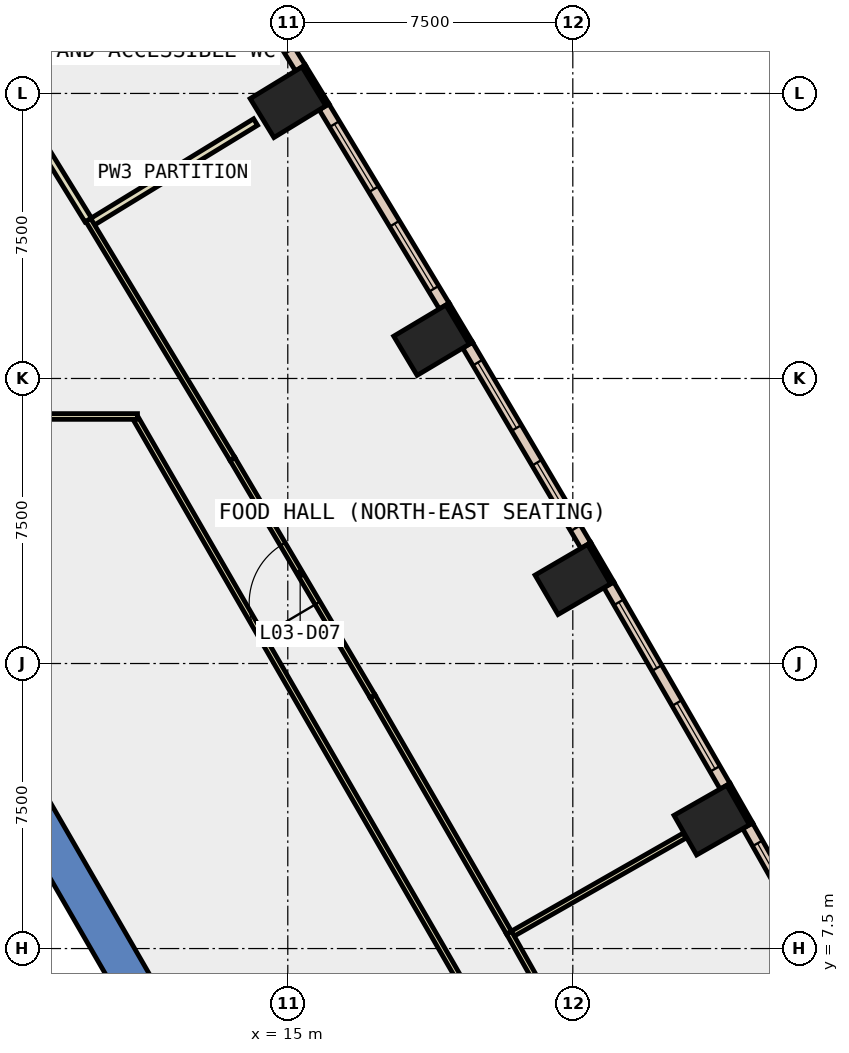
"""IFC4 building model, lengths in metres.
Left out: names, types, materials, properties, quantities, classifications, styles, units other than length and angle.
Written with IfcOpenShell. Run it as: python <this file> out.ifc"""

import sys

from ifc_helpers import new_model, si_unit, direction, frame, frame_2d, origin, origin_2d, place, context, subcontext, project, spatial, polyline, rectangle, outline, extrude, element, fill, save


model = new_model("IFC4")
c1 = context("Model", 3, precision=1e-05, world=origin(), true_north=direction((0.0, 1.0)))
c2 = subcontext(c1, "Body", "Model", "MODEL_VIEW")
j1 = project(units=[si_unit("LENGTHUNIT", "METRE"), si_unit("PLANEANGLEUNIT", "RADIAN")], contexts=[c1])
p1 = place(None, origin())
s1 = spatial("IfcSite", under=j1, at=p1, CompositionType="ELEMENT")
p2 = place(p1, origin())
s2 = spatial("IfcBuilding", under=s1, at=p2, CompositionType="ELEMENT")
p3 = place(p2, frame((0.0, 0.0, 20.0)))
s3 = spatial("IfcBuildingStorey", under=s2, at=p3, CompositionType="ELEMENT", Elevation=20.0)
for number, where, z_axis, x_axis in (
    (1, (26.155, 10.88, -0.45), (0.0, 0.0, 1.0), (-0.496, 0.869, 0.0)),
    (2, (22.5, 17.211, -0.45), (0.0, 0.0, 1.0), (-0.504, 0.864, 0.0)),
    (3, (18.782, 23.508, -0.45), (0.0, 0.0, 1.0), (-0.513, 0.858, 0.0)),
    (4, (15.005, 29.769, -0.45), (0.0, 0.0, 1.0), (-0.522, 0.853, 0.0)),
):
    element("IfcColumn", number, at=place(p3, frame(where, z_axis=z_axis, x_axis=x_axis)), inside=s3, PredefinedType="COLUMN", context=c2, shape_type="SweptSolid", body=[
        extrude(rectangle(XDim=1.2, YDim=1.6, at=origin_2d()), origin(), (0.0, 0.0, 1.0), 5.0),
    ])
p4 = place(p3, frame((0.0, 0.0, -0.45)))
e5 = element("IfcWall", 5, at=p4, inside=s3, PredefinedType="SHEAR", context=c2, shape_type="SweptSolid", body=[
    extrude(outline(polyline([(8.517, 11.748), (7.651, 11.248), (12.702, 2.5), (13.856, 2.5), (8.517, 11.748)])), origin(), (0.0, 0.0, 1.0), 5.0),
])
p5 = place(p3, frame((27.191, 10.78, 0.0), z_axis=(0.0, 0.0, 1.0), x_axis=(-0.495854054996, 0.868405870629, 0.0)))
e6 = element("IfcWall", 6, at=p5, inside=s3, PredefinedType="STANDARD", context=c2, shape_type="SweptSolid", body=[
    extrude(rectangle(XDim=1.2, YDim=0.1, at=frame_2d((0.6, 0.0))), origin(), (0.0, 0.0, 1.0), 4.55),
])
p6 = place(p3, frame((23.536, 17.122, 0.0), z_axis=(0.0, 0.0, 1.0), x_axis=(-0.504313844903, 0.863520437418, 0.0)))
e7 = element("IfcWall", 7, at=p6, inside=s3, PredefinedType="STANDARD", context=c2, shape_type="SweptSolid", body=[
    extrude(rectangle(XDim=1.2, YDim=0.1, at=frame_2d((0.6, 0.0))), origin(), (0.0, 0.0, 1.0), 4.55),
])
p7 = place(p3, frame((19.82, 23.429, 0.0), z_axis=(0.0, 0.0, 1.0), x_axis=(-0.513238760752, 0.858245870635, 0.0)))
e8 = element("IfcWall", 8, at=p7, inside=s3, PredefinedType="STANDARD", context=c2, shape_type="SweptSolid", body=[
    extrude(rectangle(XDim=1.2, YDim=0.1, at=frame_2d((0.6, 0.0))), origin(), (0.0, 0.0, 1.0), 4.55),
])
p8 = place(p3, frame((16.043, 29.7, 0.0), z_axis=(0.0, 0.0, 1.0), x_axis=(-0.521507599072, 0.853246637327, 0.0)))
e9 = element("IfcWall", 9, at=p8, inside=s3, PredefinedType="STANDARD", context=c2, shape_type="SweptSolid", body=[
    extrude(rectangle(XDim=1.2, YDim=0.1, at=frame_2d((0.6, 0.0))), origin(), (0.0, 0.0, 1.0), 4.55),
])
p9 = place(p3, frame((30.111, 5.399, 0.0), z_axis=(0.0, 0.0, 1.0), x_axis=(-0.491661677717, 0.870786308267, 0.0)))
e10 = element("IfcWall", 10, at=p9, inside=s3, PredefinedType="STANDARD", context=c2, shape_type="SweptSolid", body=[
    extrude(rectangle(XDim=6.122, YDim=0.3, at=frame_2d((3.061, 0.0))), origin(), (0.0, 0.0, 1.0), 4.55),
])
p10 = place(p9, frame((0.531, 0.0, 1.0)))
e11 = element("IfcOpeningElement", 11, at=p10, cuts=e10, PredefinedType="OPENING", context=c2, shape_type="SweptSolid", body=[
    extrude(rectangle(XDim=2.0, YDim=3.2, at=frame_2d((1.0, 1.6))), frame((0.0, 0.16, 0.0), z_axis=(0.0, -1.0, 0.0), x_axis=(1.0, 0.0, 0.0)), (0.0, 0.0, 1.0), 0.32),
])
p11 = place(p9, frame((3.592, 0.0, 1.0)))
e12 = element("IfcOpeningElement", 12, at=p11, cuts=e10, PredefinedType="OPENING", context=c2, shape_type="SweptSolid", body=[
    extrude(rectangle(XDim=2.0, YDim=3.2, at=frame_2d((1.0, 1.6))), frame((0.0, 0.16, 0.0), z_axis=(0.0, -1.0, 0.0), x_axis=(1.0, 0.0, 0.0)), (0.0, 0.0, 1.0), 0.32),
])
p12 = place(p3, frame((26.507, 11.77, 0.0), z_axis=(0.0, 0.0, 1.0), x_axis=(-0.499939977436, 0.866060055055, 0.0)))
e13 = element("IfcWall", 13, at=p12, inside=s3, PredefinedType="STANDARD", context=c2, shape_type="SweptSolid", body=[
    extrude(rectangle(XDim=6.121, YDim=0.3, at=frame_2d((3.061, 0.0))), origin(), (0.0, 0.0, 1.0), 4.55),
])
p13 = place(p12, frame((0.53, 0.0, 1.0)))
e14 = element("IfcOpeningElement", 14, at=p13, cuts=e13, PredefinedType="OPENING", context=c2, shape_type="SweptSolid", body=[
    extrude(rectangle(XDim=2.0, YDim=3.2, at=frame_2d((1.0, 1.6))), frame((0.0, 0.16, 0.0), z_axis=(0.0, -1.0, 0.0), x_axis=(1.0, 0.0, 0.0)), (0.0, 0.0, 1.0), 0.32),
])
p14 = place(p12, frame((3.591, 0.0, 1.0)))
e15 = element("IfcOpeningElement", 15, at=p14, cuts=e13, PredefinedType="OPENING", context=c2, shape_type="SweptSolid", body=[
    extrude(rectangle(XDim=2.0, YDim=3.2, at=frame_2d((1.0, 1.6))), frame((0.0, 0.16, 0.0), z_axis=(0.0, -1.0, 0.0), x_axis=(1.0, 0.0, 0.0)), (0.0, 0.0, 1.0), 0.32),
])
p15 = place(p3, frame((22.843, 18.105, 0.0), z_axis=(0.0, 0.0, 1.0), x_axis=(-0.50834231483, 0.861155091115, 0.0)))
e16 = element("IfcWall", 16, at=p15, inside=s3, PredefinedType="STANDARD", context=c2, shape_type="SweptSolid", body=[
    extrude(rectangle(XDim=6.122, YDim=0.3, at=frame_2d((3.061, 0.0))), origin(), (0.0, 0.0, 1.0), 4.55),
])
p16 = place(p15, frame((0.53, 0.0, 1.0)))
e17 = element("IfcOpeningElement", 17, at=p16, cuts=e16, PredefinedType="OPENING", context=c2, shape_type="SweptSolid", body=[
    extrude(rectangle(XDim=2.0, YDim=3.2, at=frame_2d((1.0, 1.6))), frame((0.0, 0.16, 0.0), z_axis=(0.0, -1.0, 0.0), x_axis=(1.0, 0.0, 0.0)), (0.0, 0.0, 1.0), 0.32),
])
p17 = place(p15, frame((3.591, 0.0, 1.0)))
e18 = element("IfcOpeningElement", 18, at=p17, cuts=e16, PredefinedType="OPENING", context=c2, shape_type="SweptSolid", body=[
    extrude(rectangle(XDim=2.0, YDim=3.2, at=frame_2d((1.0, 1.6))), frame((0.0, 0.16, 0.0), z_axis=(0.0, -1.0, 0.0), x_axis=(1.0, 0.0, 0.0)), (0.0, 0.0, 1.0), 0.32),
])
p18 = place(p3, frame((19.117, 24.406, 0.0), z_axis=(0.0, 0.0, 1.0), x_axis=(-0.516687651362, 0.85617397235, 0.0)))
e19 = element("IfcWall", 19, at=p18, inside=s3, PredefinedType="STANDARD", context=c2, shape_type="SweptSolid", body=[
    extrude(rectangle(XDim=6.121, YDim=0.3, at=frame_2d((3.061, 0.0))), origin(), (0.0, 0.0, 1.0), 4.55),
])
p19 = place(p18, frame((0.53, 0.0, 1.0)))
e20 = element("IfcOpeningElement", 20, at=p19, cuts=e19, PredefinedType="OPENING", context=c2, shape_type="SweptSolid", body=[
    extrude(rectangle(XDim=2.0, YDim=3.2, at=frame_2d((1.0, 1.6))), frame((0.0, 0.16, 0.0), z_axis=(0.0, -1.0, 0.0), x_axis=(1.0, 0.0, 0.0)), (0.0, 0.0, 1.0), 0.32),
])
p20 = place(p18, frame((3.591, 0.0, 1.0)))
e21 = element("IfcOpeningElement", 21, at=p20, cuts=e19, PredefinedType="OPENING", context=c2, shape_type="SweptSolid", body=[
    extrude(rectangle(XDim=2.0, YDim=3.2, at=frame_2d((1.0, 1.6))), frame((0.0, 0.16, 0.0), z_axis=(0.0, -1.0, 0.0), x_axis=(1.0, 0.0, 0.0)), (0.0, 0.0, 1.0), 0.32),
])
p21 = place(p3, frame((15.331, 30.67, 0.0), z_axis=(0.0, 0.0, 1.0), x_axis=(-0.524953701886, 0.85113078365, 0.0)))
e22 = element("IfcWall", 22, at=p21, inside=s3, PredefinedType="STANDARD", context=c2, shape_type="SweptSolid", body=[
    extrude(rectangle(XDim=6.123, YDim=0.3, at=frame_2d((3.061, 0.0))), origin(), (0.0, 0.0, 1.0), 4.55),
])
p22 = place(p21, frame((0.531, 0.0, 1.0)))
e23 = element("IfcOpeningElement", 23, at=p22, cuts=e22, PredefinedType="OPENING", context=c2, shape_type="SweptSolid", body=[
    extrude(rectangle(XDim=2.0, YDim=3.2, at=frame_2d((1.0, 1.6))), frame((0.0, 0.16, 0.0), z_axis=(0.0, -1.0, 0.0), x_axis=(1.0, 0.0, 0.0)), (0.0, 0.0, 1.0), 0.32),
])
p23 = place(p21, frame((3.592, 0.0, 1.0)))
e24 = element("IfcOpeningElement", 24, at=p23, cuts=e22, PredefinedType="OPENING", context=c2, shape_type="SweptSolid", body=[
    extrude(rectangle(XDim=2.0, YDim=3.2, at=frame_2d((1.0, 1.6))), frame((0.0, 0.16, 0.0), z_axis=(0.0, -1.0, 0.0), x_axis=(1.0, 0.0, 0.0)), (0.0, 0.0, 1.0), 0.32),
])
p24 = place(p3, frame((20.857, 7.856, 0.0), z_axis=(0.0, 0.0, 1.0), x_axis=(0.868547426395, 0.495606061407, 0.0)))
e25 = element("IfcWall", 25, at=p24, inside=s3, PredefinedType="PARTITIONING", context=c2, shape_type="SweptSolid", body=[
    extrude(rectangle(XDim=5.28, YDim=0.15, at=frame_2d((2.64, 0.0))), origin(), (0.0, 0.0, 1.0), 4.55),
])
p25 = place(p3, frame((23.918, 2.435, 0.0), z_axis=(0.0, 0.0, 1.0), x_axis=(-0.491670219182, 0.870781485546, 0.0)))
e26 = element("IfcWall", 26, at=p25, inside=s3, PredefinedType="PARTITIONING", context=c2, shape_type="SweptSolid", body=[
    extrude(rectangle(XDim=6.299, YDim=0.15, at=frame_2d((3.149, 0.0))), origin(), (0.0, 0.0, 1.0), 4.55),
])
p26 = place(p3, frame((9.801, 26.587, 0.0), z_axis=(0.0, 0.0, 1.0), x_axis=(0.853180048432, 0.521616530564, 0.0)))
e27 = element("IfcWall", 27, at=p26, inside=s3, PredefinedType="PARTITIONING", context=c2, shape_type="SweptSolid", body=[
    extrude(rectangle(XDim=5.1, YDim=0.2, at=frame_2d((2.55, 0.0))), origin(), (0.0, 0.0, 1.0), 4.55),
])
p27 = place(p3, frame((20.82, 7.919, 0.0), z_axis=(0.0, 0.0, 1.0), x_axis=(-0.49986672167, 0.866102338391, 0.0)))
e28 = element("IfcWall", 28, at=p27, inside=s3, PredefinedType="PARTITIONING", context=c2, shape_type="SweptSolid", body=[
    extrude(rectangle(XDim=7.178, YDim=0.15, at=frame_2d((3.589, 0.0))), origin(), (0.0, 0.0, 1.0), 4.55),
])
p28 = place(p3, frame((17.232, 14.136, 0.0), z_axis=(0.0, 0.0, 1.0), x_axis=(-0.508434454558, 0.861100694122, 0.0)))
e29 = element("IfcWall", 29, at=p28, inside=s3, PredefinedType="PARTITIONING", context=c2, shape_type="SweptSolid", body=[
    extrude(rectangle(XDim=7.254, YDim=0.15, at=frame_2d((3.627, 0.0))), origin(), (0.0, 0.0, 1.0), 4.55),
])
p29 = place(p28, frame((2.849, 0.0, 0.0)))
e30 = element("IfcOpeningElement", 30, at=p29, cuts=e29, PredefinedType="OPENING", context=c2, shape_type="SweptSolid", body=[
    extrude(rectangle(XDim=1.8, YDim=2.1, at=frame_2d((0.9, 1.05))), frame((0.0, 0.085, 0.0), z_axis=(0.0, -1.0, 0.0), x_axis=(1.0, 0.0, 0.0)), (0.0, 0.0, 1.0), 0.17),
])
p30 = place(p3, frame((13.544, 20.382, 0.0), z_axis=(0.0, 0.0, 1.0), x_axis=(-0.516527204033, 0.856270779306, 0.0)))
e31 = element("IfcWall", 31, at=p30, inside=s3, PredefinedType="PARTITIONING", context=c2, shape_type="SweptSolid", body=[
    extrude(rectangle(XDim=7.347, YDim=0.15, at=frame_2d((3.673, 0.0))), origin(), (0.0, 0.0, 1.0), 4.55),
])
p31 = place(p3, frame((9.748, 26.672, 0.0), z_axis=(0.0, 0.0, 1.0), x_axis=(-0.52483723921, 0.851202603578, 0.0)))
e32 = element("IfcWall", 32, at=p31, inside=s3, PredefinedType="PARTITIONING", context=c2, shape_type="SweptSolid", body=[
    extrude(rectangle(XDim=7.16, YDim=0.2, at=frame_2d((3.58, 0.0))), origin(), (0.0, 0.0, 1.0), 4.55),
])
p32 = place(p3, frame((11.007, 21.435, 0.0), z_axis=(0.0, 0.0, 1.0), x_axis=(0.499977403953, -0.866038449225, 0.0)))
e33 = element("IfcWall", 33, at=p32, inside=s3, PredefinedType="PARTITIONING", context=c2, shape_type="SweptSolid", body=[
    extrude(rectangle(XDim=21.939, YDim=0.15, at=frame_2d((10.969, 0.0))), origin(), (0.0, 0.0, 1.0), 4.55),
])
p33 = place(p3, frame((0.4, 21.5, 0.0), z_axis=(0.0, 0.0, 1.0), x_axis=(1.0, 0.0, 0.0)))
e34 = element("IfcWall", 34, at=p33, inside=s3, PredefinedType="PARTITIONING", context=c2, shape_type="SweptSolid", body=[
    extrude(rectangle(XDim=10.645, YDim=0.15, at=frame_2d((5.323, 0.0))), origin(), (0.0, 0.0, 1.0), 4.55),
])
p34 = place(p33, frame((0.021, 0.0, 0.0)))
e35 = element("IfcOpeningElement", 35, at=p34, cuts=e34, PredefinedType="OPENING", context=c2, shape_type="SweptSolid", body=[
    extrude(rectangle(XDim=1.8, YDim=2.1, at=frame_2d((0.9, 1.05))), frame((0.0, 0.085, 0.0), z_axis=(0.0, -1.0, 0.0), x_axis=(1.0, 0.0, 0.0)), (0.0, 0.0, 1.0), 0.17),
])
p35 = place(p11, origin())
e36 = element("IfcWindow", 36, at=p35, inside=s3, PartitioningType="SINGLE_PANEL", PredefinedType="WINDOW", context=c2, shape_type="SweptSolid", body=[
    extrude(rectangle(XDim=2.0, YDim=3.2, at=frame_2d((1.0, 1.6))), frame((0.0, 0.03, 0.0), z_axis=(0.0, -1.0, 0.0), x_axis=(1.0, 0.0, 0.0)), (0.0, 0.0, 1.0), 0.06),
])
fill(e12, e36)
p36 = place(p13, origin())
e37 = element("IfcWindow", 37, at=p36, inside=s3, PartitioningType="SINGLE_PANEL", PredefinedType="WINDOW", context=c2, shape_type="SweptSolid", body=[
    extrude(rectangle(XDim=2.0, YDim=3.2, at=frame_2d((1.0, 1.6))), frame((0.0, 0.03, 0.0), z_axis=(0.0, -1.0, 0.0), x_axis=(1.0, 0.0, 0.0)), (0.0, 0.0, 1.0), 0.06),
])
fill(e14, e37)
p37 = place(p14, origin())
e38 = element("IfcWindow", 38, at=p37, inside=s3, PartitioningType="SINGLE_PANEL", PredefinedType="WINDOW", context=c2, shape_type="SweptSolid", body=[
    extrude(rectangle(XDim=2.0, YDim=3.2, at=frame_2d((1.0, 1.6))), frame((0.0, 0.03, 0.0), z_axis=(0.0, -1.0, 0.0), x_axis=(1.0, 0.0, 0.0)), (0.0, 0.0, 1.0), 0.06),
])
fill(e15, e38)
p38 = place(p16, origin())
e39 = element("IfcWindow", 39, at=p38, inside=s3, PartitioningType="SINGLE_PANEL", PredefinedType="WINDOW", context=c2, shape_type="SweptSolid", body=[
    extrude(rectangle(XDim=2.0, YDim=3.2, at=frame_2d((1.0, 1.6))), frame((0.0, 0.03, 0.0), z_axis=(0.0, -1.0, 0.0), x_axis=(1.0, 0.0, 0.0)), (0.0, 0.0, 1.0), 0.06),
])
fill(e17, e39)
p39 = place(p17, origin())
e40 = element("IfcWindow", 40, at=p39, inside=s3, PartitioningType="SINGLE_PANEL", PredefinedType="WINDOW", context=c2, shape_type="SweptSolid", body=[
    extrude(rectangle(XDim=2.0, YDim=3.2, at=frame_2d((1.0, 1.6))), frame((0.0, 0.03, 0.0), z_axis=(0.0, -1.0, 0.0), x_axis=(1.0, 0.0, 0.0)), (0.0, 0.0, 1.0), 0.06),
])
fill(e18, e40)
p40 = place(p19, origin())
e41 = element("IfcWindow", 41, at=p40, inside=s3, PartitioningType="SINGLE_PANEL", PredefinedType="WINDOW", context=c2, shape_type="SweptSolid", body=[
    extrude(rectangle(XDim=2.0, YDim=3.2, at=frame_2d((1.0, 1.6))), frame((0.0, 0.03, 0.0), z_axis=(0.0, -1.0, 0.0), x_axis=(1.0, 0.0, 0.0)), (0.0, 0.0, 1.0), 0.06),
])
fill(e20, e41)
p41 = place(p20, origin())
e42 = element("IfcWindow", 42, at=p41, inside=s3, PartitioningType="SINGLE_PANEL", PredefinedType="WINDOW", context=c2, shape_type="SweptSolid", body=[
    extrude(rectangle(XDim=2.0, YDim=3.2, at=frame_2d((1.0, 1.6))), frame((0.0, 0.03, 0.0), z_axis=(0.0, -1.0, 0.0), x_axis=(1.0, 0.0, 0.0)), (0.0, 0.0, 1.0), 0.06),
])
fill(e21, e42)
p42 = place(p29, origin())
e43 = element("IfcDoor", 43, at=p42, inside=s3, OperationType="DOUBLE_DOOR_SINGLE_SWING", PredefinedType="DOOR", context=c2, shape_type="SweptSolid", body=[
    extrude(rectangle(XDim=1.8, YDim=2.1, at=frame_2d((0.9, 1.05))), frame((0.0, 0.025, 0.0), z_axis=(0.0, -1.0, 0.0), x_axis=(1.0, 0.0, 0.0)), (0.0, 0.0, 1.0), 0.05),
])
fill(e30, e43)
save(model, sys.argv[1])
